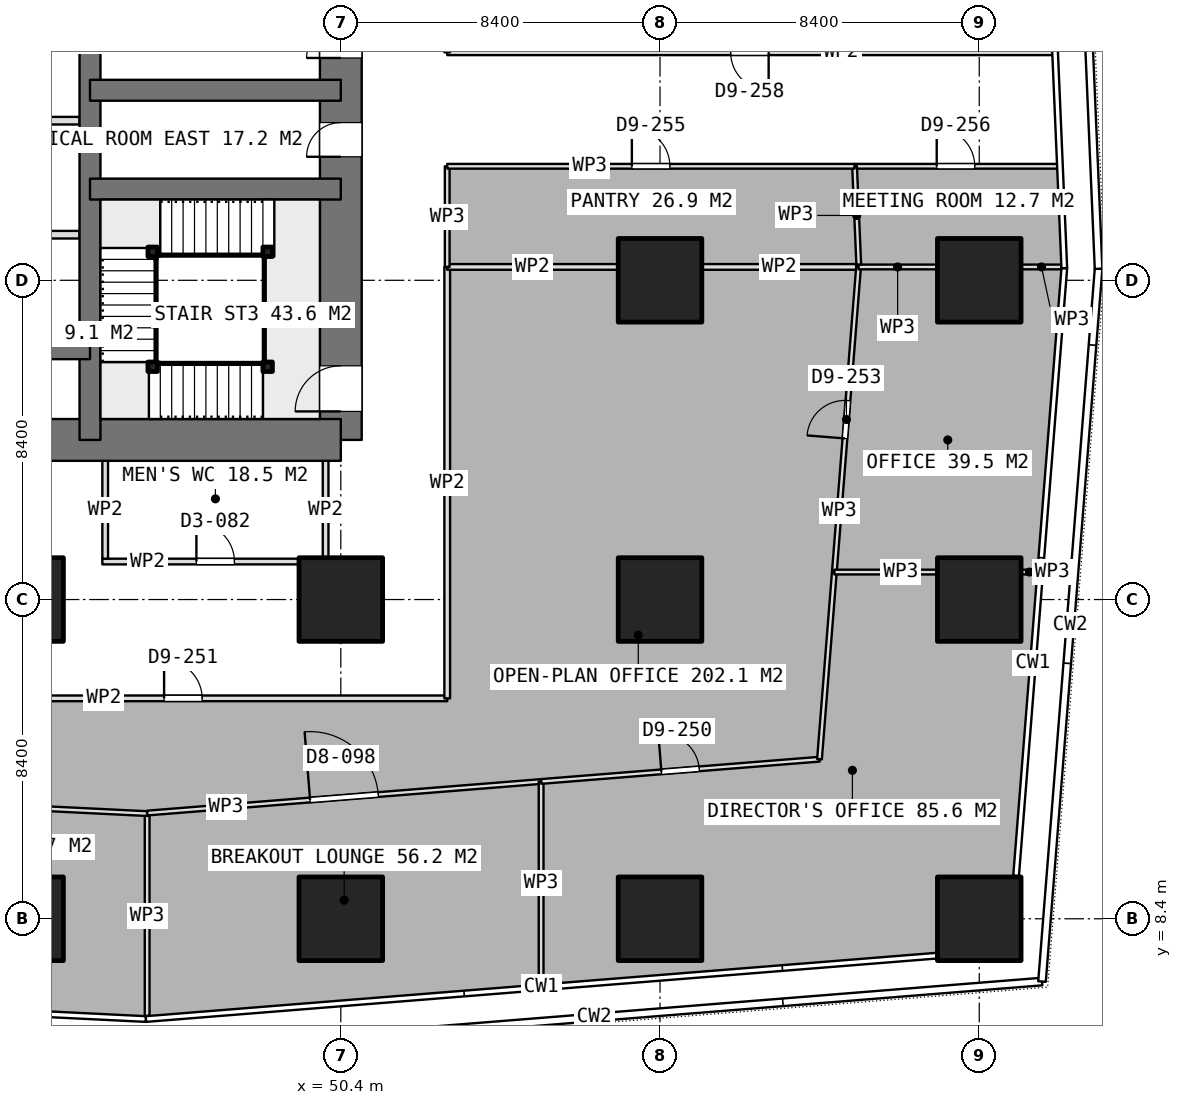
"""IFC4 building model, lengths in metres.
Left out: names, types, materials, properties, quantities, classifications, styles, units other than length and angle.
Written with IfcOpenShell. Run it as: python <this file> out.ifc"""

import sys

from ifc_helpers import new_model, si_unit, direction, frame, frame_2d, origin, origin_2d, place, context, subcontext, project, spatial, rectangle, extrude, element, fill, save


model = new_model("IFC4")
c1 = context("Model", 3, precision=1e-05, world=origin(), true_north=direction((0.0, 1.0)))
c2 = subcontext(c1, "Body", "Model", "MODEL_VIEW")
j1 = project(units=[si_unit("LENGTHUNIT", "METRE"), si_unit("PLANEANGLEUNIT", "RADIAN")], contexts=[c1])
p1 = place(None, origin())
s1 = spatial("IfcSite", under=j1, at=p1, CompositionType="ELEMENT")
p2 = place(p1, origin())
s2 = spatial("IfcBuilding", under=s1, at=p2, CompositionType="ELEMENT")
p3 = place(p2, frame((0.0, 0.0, 74.15)))
s3 = spatial("IfcBuildingStorey", under=s2, at=p3, CompositionType="ELEMENT", Elevation=74.15)
p4 = place(p3, frame((40.0, 21.0, 0.0), z_axis=(0.0, 0.0, 1.0), x_axis=(1.0, 0.0, 0.0)))
e1 = element("IfcWall", 1, at=p4, inside=s3, PredefinedType="SHEAR", context=c2, shape_type="SweptSolid", body=[
    extrude(rectangle(XDim=10.4, YDim=1.1, at=frame_2d((5.2, 0.0))), origin(), (0.0, 0.0, 1.0), 3.75),
])
p5 = place(p3, frame((50.4, 21.0, 0.0), z_axis=(0.0, 0.0, 1.0), x_axis=(0.0, 1.0, 0.0)))
e2 = element("IfcWall", 2, at=p5, inside=s3, PredefinedType="SHEAR", context=c2, shape_type="SweptSolid", body=[
    extrude(rectangle(XDim=25.2, YDim=1.1, at=frame_2d((12.6, 0.0))), origin(), (0.0, 0.0, 1.0), 3.75),
])
p6 = place(p5, frame((16.2, 0.0, 0.0)))
e3 = element("IfcOpeningElement", 3, at=p6, cuts=e2, PredefinedType="OPENING", context=c2, shape_type="SweptSolid", body=[
    extrude(rectangle(XDim=1.2, YDim=2.1, at=frame_2d((0.6, 1.05))), frame((0.0, 0.56, 0.0), z_axis=(0.0, -1.0, 0.0), x_axis=(1.0, 0.0, 0.0)), (0.0, 0.0, 1.0), 1.12),
])
p7 = place(p5, frame((10.05, 0.0, 0.0)))
e4 = element("IfcOpeningElement", 4, at=p7, cuts=e2, PredefinedType="OPENING", context=c2, shape_type="SweptSolid", body=[
    extrude(rectangle(XDim=0.9, YDim=2.1, at=frame_2d((0.45, 1.05))), frame((0.0, 0.56, 0.0), z_axis=(0.0, -1.0, 0.0), x_axis=(1.0, 0.0, 0.0)), (0.0, 0.0, 1.0), 1.12),
])
p8 = place(p5, frame((7.45, 0.0, 0.0)))
e5 = element("IfcOpeningElement", 5, at=p8, cuts=e2, PredefinedType="OPENING", context=c2, shape_type="SweptSolid", body=[
    extrude(rectangle(XDim=0.9, YDim=2.1, at=frame_2d((0.45, 1.05))), frame((0.0, 0.56, 0.0), z_axis=(0.0, -1.0, 0.0), x_axis=(1.0, 0.0, 0.0)), (0.0, 0.0, 1.0), 1.12),
])
p9 = place(p5, frame((0.75, 0.0, 0.0)))
e6 = element("IfcOpeningElement", 6, at=p9, cuts=e2, PredefinedType="OPENING", context=c2, shape_type="SweptSolid", body=[
    extrude(rectangle(XDim=1.2, YDim=2.1, at=frame_2d((0.6, 1.05))), frame((0.0, 0.56, 0.0), z_axis=(0.0, -1.0, 0.0), x_axis=(1.0, 0.0, 0.0)), (0.0, 0.0, 1.0), 1.12),
])
p10 = place(p3, frame((43.8, 21.0, 0.0), z_axis=(0.0, 0.0, 1.0), x_axis=(0.0, 1.0, 0.0)))
e7 = element("IfcWall", 7, at=p10, inside=s3, PredefinedType="SHEAR", context=c2, shape_type="SweptSolid", body=[
    extrude(rectangle(XDim=25.2, YDim=0.55, at=frame_2d((12.6, 0.0))), origin(), (0.0, 0.0, 1.0), 3.75),
])
p11 = place(p3, frame((40.0, 23.4, 0.0), z_axis=(0.0, 0.0, 1.0), x_axis=(1.0, 0.0, 0.0)))
e8 = element("IfcWall", 8, at=p11, inside=s3, PredefinedType="SHEAR", context=c2, shape_type="SweptSolid", body=[
    extrude(rectangle(XDim=3.8, YDim=0.55, at=frame_2d((1.9, 0.0))), origin(), (0.0, 0.0, 1.0), 3.75),
])
for number, where, z_axis, x_axis in (
    (9, (43.8, 27.6, 0.0), (0.0, 0.0, 1.0), (1.0, 0.0, 0.0)),
    (10, (43.8, 30.2, 0.0), (0.0, 0.0, 1.0), (1.0, 0.0, 0.0)),
):
    element("IfcWall", number, at=place(p3, frame(where, z_axis=z_axis, x_axis=x_axis)), inside=s3, PredefinedType="SHEAR", context=c2, shape_type="SweptSolid", body=[
        extrude(rectangle(XDim=6.6, YDim=0.55, at=frame_2d((3.3, 0.0))), origin(), (0.0, 0.0, 1.0), 3.75),
    ])
for number, where, z_axis, x_axis in (
    (11, (42.0, 8.4, 0.0), (0.0, 0.0, 1.0), (1.0, 0.0, 0.0)),
    (12, (42.0, 16.8, 0.0), (0.0, 0.0, 1.0), (1.0, 0.0, 0.0)),
    (13, (50.4, 8.4, 0.0), (0.0, 0.0, 1.0), (1.0, 0.0, 0.0)),
    (14, (50.4, 16.8, 0.0), (0.0, 0.0, 1.0), (1.0, 0.0, 0.0)),
    (15, (58.8, 8.4, 0.0), (0.0, 0.0, 1.0), (1.0, 0.0, 0.0)),
    (16, (58.8, 16.8, 0.0), (0.0, 0.0, 1.0), (1.0, 0.0, 0.0)),
    (17, (58.8, 25.2, 0.0), (0.0, 0.0, 1.0), (1.0, 0.0, 0.0)),
    (18, (67.2, 8.4, 0.0), (0.0, 0.0, 1.0), (1.0, 0.0, 0.0)),
    (19, (67.2, 16.8, 0.0), (0.0, 0.0, 1.0), (1.0, 0.0, 0.0)),
    (20, (67.2, 25.2, 0.0), (0.0, 0.0, 1.0), (1.0, 0.0, 0.0)),
):
    element("IfcColumn", number, at=place(p3, frame(where, z_axis=z_axis, x_axis=x_axis)), inside=s3, PredefinedType="COLUMN", context=c2, shape_type="SweptSolid", body=[
        extrude(rectangle(XDim=2.2, YDim=2.2, at=origin_2d()), origin(), (0.0, 0.0, 1.0), 3.75),
    ])
for number, where, z_axis, x_axis in (
    (21, (40.5, 26.4, 0.0), (0.0, 0.0, 1.0), (1.0, 0.0, 0.0)),
    (22, (40.5, 29.4, 0.0), (0.0, 0.0, 1.0), (1.0, 0.0, 0.0)),
):
    element("IfcWall", number, at=place(p3, frame(where, z_axis=z_axis, x_axis=x_axis)), inside=s3, PredefinedType="PARTITIONING", context=c2, shape_type="SweptSolid", body=[
        extrude(rectangle(XDim=3.025, YDim=0.2, at=frame_2d((1.512, 0.0))), origin(), (0.0, 0.0, 1.0), 3.5),
    ])
p12 = place(p3, frame((44.125, 17.8, 0.0), z_axis=(0.0, 0.0, 1.0), x_axis=(1.0, 0.0, 0.0)))
e23 = element("IfcWall", 23, at=p12, inside=s3, PredefinedType="PARTITIONING", context=c2, shape_type="SweptSolid", body=[
    extrude(rectangle(XDim=5.95, YDim=0.15, at=frame_2d((2.975, 0.0))), origin(), (0.0, 0.0, 1.0), 3.5),
])
p13 = place(p12, frame((2.475, 0.0, 0.0)))
e24 = element("IfcOpeningElement", 24, at=p13, cuts=e23, PredefinedType="OPENING", context=c2, shape_type="SweptSolid", body=[
    extrude(rectangle(XDim=1.0, YDim=2.1, at=frame_2d((0.5, 1.05))), frame((0.0, 0.085, 0.0), z_axis=(0.0, -1.0, 0.0), x_axis=(1.0, 0.0, 0.0)), (0.0, 0.0, 1.0), 0.17),
])
for number, where, z_axis, x_axis in (
    (25, (44.2, 17.875, 0.0), (0.0, 0.0, 1.0), (0.0, 1.0, 0.0)),
    (26, (50.0, 17.875, 0.0), (0.0, 0.0, 1.0), (0.0, 1.0, 0.0)),
):
    element("IfcWall", number, at=place(p3, frame(where, z_axis=z_axis, x_axis=x_axis)), inside=s3, PredefinedType="PARTITIONING", context=c2, shape_type="SweptSolid", body=[
        extrude(rectangle(XDim=2.575, YDim=0.15, at=frame_2d((1.288, 0.0))), origin(), (0.0, 0.0, 1.0), 3.5),
    ])
p14 = place(p3, frame((36.299, 11.609, 0.0), z_axis=(0.0, 0.0, 1.0), x_axis=(0.998798622269, -0.049003185143, 0.0)))
e27 = element("IfcWall", 27, at=p14, inside=s3, PredefinedType="PARTITIONING", context=c2, shape_type="SweptSolid", body=[
    extrude(rectangle(XDim=9.018, YDim=0.125, at=frame_2d((4.509, 0.0))), origin(), (0.0, 0.0, 1.0), 3.5),
])
p15 = place(p14, frame((3.608, 0.0, 0.0)))
e28 = element("IfcOpeningElement", 28, at=p15, cuts=e27, PredefinedType="OPENING", context=c2, shape_type="SweptSolid", body=[
    extrude(rectangle(XDim=1.8, YDim=2.1, at=frame_2d((0.9, 1.05))), frame((0.0, 0.073, 0.0), z_axis=(0.0, -1.0, 0.0), x_axis=(1.0, 0.0, 0.0)), (0.0, 0.0, 1.0), 0.145),
])
p16 = place(p3, frame((45.304, 11.107, 0.0), z_axis=(0.0, 0.0, 1.0), x_axis=(0.0, -1.0, 0.0)))
e29 = element("IfcWall", 29, at=p16, inside=s3, PredefinedType="PARTITIONING", context=c2, shape_type="SweptSolid", body=[
    extrude(rectangle(XDim=5.262, YDim=0.125, at=frame_2d((2.631, 0.0))), origin(), (0.0, 0.0, 1.0), 3.5),
])
p17 = place(p3, frame((45.307, 11.182, 0.0), z_axis=(0.0, 0.0, 1.0), x_axis=(0.996807957409, 0.079836683593, 0.0)))
e30 = element("IfcWall", 30, at=p17, inside=s3, PredefinedType="PARTITIONING", context=c2, shape_type="SweptSolid", body=[
    extrude(rectangle(XDim=10.397, YDim=0.125, at=frame_2d((5.199, 0.0))), origin(), (0.0, 0.0, 1.0), 3.5),
])
p18 = place(p17, frame((4.298, 0.0, 0.0)))
e31 = element("IfcOpeningElement", 31, at=p18, cuts=e30, PredefinedType="OPENING", context=c2, shape_type="SweptSolid", body=[
    extrude(rectangle(XDim=1.8, YDim=2.1, at=frame_2d((0.9, 1.05))), frame((0.0, 0.073, 0.0), z_axis=(0.0, -1.0, 0.0), x_axis=(1.0, 0.0, 0.0)), (0.0, 0.0, 1.0), 0.145),
])
p19 = place(p3, frame((55.671, 12.012, 0.0), z_axis=(0.0, 0.0, 1.0), x_axis=(0.0, -1.0, 0.0)))
e32 = element("IfcWall", 32, at=p19, inside=s3, PredefinedType="PARTITIONING", context=c2, shape_type="SweptSolid", body=[
    extrude(rectangle(XDim=5.337, YDim=0.125, at=frame_2d((2.668, 0.0))), origin(), (0.0, 0.0, 1.0), 3.5),
])
p20 = place(p3, frame((55.673, 12.013, 0.0), z_axis=(0.0, 0.0, 1.0), x_axis=(0.996811579084, 0.079791451955, 0.0)))
e33 = element("IfcWall", 33, at=p20, inside=s3, PredefinedType="PARTITIONING", context=c2, shape_type="SweptSolid", body=[
    extrude(rectangle(XDim=7.346, YDim=0.125, at=frame_2d((3.673, 0.0))), origin(), (0.0, 0.0, 1.0), 3.5),
])
p21 = place(p20, frame((3.173, 0.0, 0.0)))
e34 = element("IfcOpeningElement", 34, at=p21, cuts=e33, PredefinedType="OPENING", context=c2, shape_type="SweptSolid", body=[
    extrude(rectangle(XDim=1.0, YDim=2.1, at=frame_2d((0.5, 1.05))), frame((0.0, 0.073, 0.0), z_axis=(0.0, -1.0, 0.0), x_axis=(1.0, 0.0, 0.0)), (0.0, 0.0, 1.0), 0.145),
])
p22 = place(p3, frame((62.996, 12.599, 0.0), z_axis=(0.0, 0.0, 1.0), x_axis=(0.079134233178, 0.996863969225, 0.0)))
e35 = element("IfcWall", 35, at=p22, inside=s3, PredefinedType="PARTITIONING", context=c2, shape_type="SweptSolid", body=[
    extrude(rectangle(XDim=4.939, YDim=0.125, at=frame_2d((2.47, 0.0))), origin(), (0.0, 0.0, 1.0), 3.5),
])
p23 = place(p3, frame((63.387, 17.523, 0.0), z_axis=(0.0, 0.0, 1.0), x_axis=(1.0, 0.0, 0.0)))
e36 = element("IfcWall", 36, at=p23, inside=s3, PredefinedType="PARTITIONING", context=c2, shape_type="SweptSolid", body=[
    extrude(rectangle(XDim=2.693, YDim=0.125, at=frame_2d((1.347, 0.0))), origin(), (0.0, 0.0, 1.0), 3.5),
])
p24 = place(p3, frame((68.32, 17.523, 0.0), z_axis=(0.0, 0.0, 1.0), x_axis=(1.0, 0.0, 0.0)))
e37 = element("IfcWall", 37, at=p24, inside=s3, PredefinedType="PARTITIONING", context=c2, shape_type="SweptSolid", body=[
    extrude(rectangle(XDim=0.403, YDim=0.125, at=frame_2d((0.201, 0.0))), origin(), (0.0, 0.0, 1.0), 3.5),
])
p25 = place(p3, frame((63.387, 17.524, 0.0), z_axis=(0.0, 0.0, 1.0), x_axis=(0.079102910118, 0.996866455254, 0.0)))
e38 = element("IfcWall", 38, at=p25, inside=s3, PredefinedType="PARTITIONING", context=c2, shape_type="SweptSolid", body=[
    extrude(rectangle(XDim=8.052, YDim=0.125, at=frame_2d((4.026, 0.0))), origin(), (0.0, 0.0, 1.0), 3.5),
])
p26 = place(p25, frame((3.526, 0.0, 0.0)))
e39 = element("IfcOpeningElement", 39, at=p26, cuts=e38, PredefinedType="OPENING", context=c2, shape_type="SweptSolid", body=[
    extrude(rectangle(XDim=1.0, YDim=2.1, at=frame_2d((0.5, 1.05))), frame((0.0, 0.073, 0.0), z_axis=(0.0, -1.0, 0.0), x_axis=(1.0, 0.0, 0.0)), (0.0, 0.0, 1.0), 0.145),
])
p27 = place(p3, frame((64.024, 25.551, 0.0), z_axis=(0.0, 0.0, 1.0), x_axis=(1.0, 0.0, 0.0)))
e40 = element("IfcWall", 40, at=p27, inside=s3, PredefinedType="PARTITIONING", context=c2, shape_type="SweptSolid", body=[
    extrude(rectangle(XDim=2.056, YDim=0.125, at=frame_2d((1.028, 0.0))), origin(), (0.0, 0.0, 1.0), 3.5),
])
p28 = place(p3, frame((68.32, 25.551, 0.0), z_axis=(0.0, 0.0, 1.0), x_axis=(1.0, 0.0, 0.0)))
e41 = element("IfcWall", 41, at=p28, inside=s3, PredefinedType="PARTITIONING", context=c2, shape_type="SweptSolid", body=[
    extrude(rectangle(XDim=1.037, YDim=0.125, at=frame_2d((0.519, 0.0))), origin(), (0.0, 0.0, 1.0), 3.5),
])
p29 = place(p3, frame((39.3, 14.2, 0.0), z_axis=(0.0, 0.0, 1.0), x_axis=(1.0, 0.0, 0.0)))
e42 = element("IfcWall", 42, at=p29, inside=s3, PredefinedType="PARTITIONING", context=c2, shape_type="SweptSolid", body=[
    extrude(rectangle(XDim=13.9, YDim=0.15, at=frame_2d((6.95, 0.0))), origin(), (0.0, 0.0, 1.0), 3.5),
])
p30 = place(p29, frame((6.45, 0.0, 0.0)))
e43 = element("IfcOpeningElement", 43, at=p30, cuts=e42, PredefinedType="OPENING", context=c2, shape_type="SweptSolid", body=[
    extrude(rectangle(XDim=1.0, YDim=2.1, at=frame_2d((0.5, 1.05))), frame((0.0, 0.085, 0.0), z_axis=(0.0, -1.0, 0.0), x_axis=(1.0, 0.0, 0.0)), (0.0, 0.0, 1.0), 0.17),
])
p31 = place(p3, frame((53.2, 14.2, 0.0), z_axis=(0.0, 0.0, 1.0), x_axis=(0.0, 1.0, 0.0)))
e44 = element("IfcWall", 44, at=p31, inside=s3, PredefinedType="PARTITIONING", context=c2, shape_type="SweptSolid", body=[
    extrude(rectangle(XDim=11.352, YDim=0.15, at=frame_2d((5.676, 0.0))), origin(), (0.0, 0.0, 1.0), 3.5),
])
p32 = place(p3, frame((53.2, 25.552, 0.0), z_axis=(0.0, 0.0, 1.0), x_axis=(1.0, 0.0, 0.0)))
e45 = element("IfcWall", 45, at=p32, inside=s3, PredefinedType="PARTITIONING", context=c2, shape_type="SweptSolid", body=[
    extrude(rectangle(XDim=4.48, YDim=0.15, at=frame_2d((2.24, 0.0))), origin(), (0.0, 0.0, 1.0), 3.5),
])
p33 = place(p3, frame((59.92, 25.552, 0.0), z_axis=(0.0, 0.0, 1.0), x_axis=(1.0, 0.0, 0.0)))
e46 = element("IfcWall", 46, at=p33, inside=s3, PredefinedType="PARTITIONING", context=c2, shape_type="SweptSolid", body=[
    extrude(rectangle(XDim=4.041, YDim=0.15, at=frame_2d((2.021, 0.0))), origin(), (0.0, 0.0, 1.0), 3.5),
])
p34 = place(p3, frame((69.145, 31.2, 0.0), z_axis=(0.0, 0.0, 1.0), x_axis=(-1.0, 0.0, 0.0)))
e47 = element("IfcWall", 47, at=p34, inside=s3, PredefinedType="PARTITIONING", context=c2, shape_type="SweptSolid", body=[
    extrude(rectangle(XDim=15.945, YDim=0.15, at=frame_2d((7.973, 0.0))), origin(), (0.0, 0.0, 1.0), 3.5),
])
p35 = place(p34, frame((7.487, 0.0, 0.0)))
e48 = element("IfcOpeningElement", 48, at=p35, cuts=e47, PredefinedType="OPENING", context=c2, shape_type="SweptSolid", body=[
    extrude(rectangle(XDim=1.0, YDim=2.1, at=frame_2d((0.5, 1.05))), frame((0.0, 0.085, 0.0), z_axis=(0.0, -1.0, 0.0), x_axis=(1.0, 0.0, 0.0)), (0.0, 0.0, 1.0), 0.17),
])
p36 = place(p3, frame((63.919, 28.2, 0.0), z_axis=(0.0, 0.0, 1.0), x_axis=(1.0, 0.0, 0.0)))
e49 = element("IfcWall", 49, at=p36, inside=s3, PredefinedType="PARTITIONING", context=c2, shape_type="SweptSolid", body=[
    extrude(rectangle(XDim=5.355, YDim=0.125, at=frame_2d((2.677, 0.0))), origin(), (0.0, 0.0, 1.0), 3.5),
])
p37 = place(p36, frame((2.162, 0.0, 0.0)))
e50 = element("IfcOpeningElement", 50, at=p37, cuts=e49, PredefinedType="OPENING", context=c2, shape_type="SweptSolid", body=[
    extrude(rectangle(XDim=1.0, YDim=2.1, at=frame_2d((0.5, 1.05))), frame((0.0, 0.073, 0.0), z_axis=(0.0, -1.0, 0.0), x_axis=(1.0, 0.0, 0.0)), (0.0, 0.0, 1.0), 0.145),
])
p38 = place(p3, frame((64.029, 25.613, 0.0), z_axis=(0.0, 0.0, 1.0), x_axis=(-0.042524729329, 0.99909541456, 0.0)))
e51 = element("IfcWall", 51, at=p38, inside=s3, PredefinedType="PARTITIONING", context=c2, shape_type="SweptSolid", body=[
    extrude(rectangle(XDim=2.589, YDim=0.125, at=frame_2d((1.295, 0.0))), origin(), (0.0, 0.0, 1.0), 3.5),
])
p39 = place(p3, frame((53.2, 25.552, 0.0), z_axis=(0.0, 0.0, 1.0), x_axis=(0.0, 1.0, 0.0)))
e52 = element("IfcWall", 52, at=p39, inside=s3, PredefinedType="PARTITIONING", context=c2, shape_type="SweptSolid", body=[
    extrude(rectangle(XDim=2.648, YDim=0.125, at=frame_2d((1.324, 0.0))), origin(), (0.0, 0.0, 1.0), 3.5),
])
p40 = place(p3, frame((53.2, 28.2, 0.0), z_axis=(0.0, 0.0, 1.0), x_axis=(1.0, 0.0, 0.0)))
e53 = element("IfcWall", 53, at=p40, inside=s3, PredefinedType="PARTITIONING", context=c2, shape_type="SweptSolid", body=[
    extrude(rectangle(XDim=10.719, YDim=0.125, at=frame_2d((5.359, 0.0))), origin(), (0.0, 0.0, 1.0), 3.5),
])
p41 = place(p40, frame((4.859, 0.0, 0.0)))
e54 = element("IfcOpeningElement", 54, at=p41, cuts=e53, PredefinedType="OPENING", context=c2, shape_type="SweptSolid", body=[
    extrude(rectangle(XDim=1.0, YDim=2.1, at=frame_2d((0.5, 1.05))), frame((0.0, 0.073, 0.0), z_axis=(0.0, -1.0, 0.0), x_axis=(1.0, 0.0, 0.0)), (0.0, 0.0, 1.0), 0.145),
])
for number, where, z_axis, x_axis in (
    (55, (48.475, 22.925, 0.0), (0.0, 0.0, 1.0), (1.0, 0.0, 0.0)),
    (56, (45.45, 22.925, 0.0), (0.0, 0.0, 1.0), (1.0, 0.0, 0.0)),
    (57, (45.45, 25.95, 0.0), (0.0, 0.0, 1.0), (1.0, 0.0, 0.0)),
    (58, (48.475, 25.95, 0.0), (0.0, 0.0, 1.0), (1.0, 0.0, 0.0)),
):
    element("IfcColumn", number, at=place(p3, frame(where, z_axis=z_axis, x_axis=x_axis)), inside=s3, PredefinedType="COLUMN", context=c2, shape_type="SweptSolid", body=[
        extrude(rectangle(XDim=0.25, YDim=0.25, at=origin_2d()), origin(), (0.0, 0.0, 1.0), 3.75),
    ])
p42 = place(p7, origin())
e59 = element("IfcDoor", 59, at=p42, inside=s3, OperationType="SINGLE_SWING_LEFT", PredefinedType="DOOR", context=c2, shape_type="SweptSolid", body=[
    extrude(rectangle(XDim=0.9, YDim=2.1, at=frame_2d((0.45, 1.05))), frame((0.0, 0.025, 0.0), z_axis=(0.0, -1.0, 0.0), x_axis=(1.0, 0.0, 0.0)), (0.0, 0.0, 1.0), 0.05),
])
fill(e4, e59)
p43 = place(p8, origin())
e60 = element("IfcDoor", 60, at=p43, inside=s3, OperationType="SINGLE_SWING_LEFT", PredefinedType="DOOR", context=c2, shape_type="SweptSolid", body=[
    extrude(rectangle(XDim=0.9, YDim=2.1, at=frame_2d((0.45, 1.05))), frame((0.0, 0.025, 0.0), z_axis=(0.0, -1.0, 0.0), x_axis=(1.0, 0.0, 0.0)), (0.0, 0.0, 1.0), 0.05),
])
fill(e5, e60)
p44 = place(p13, origin())
e61 = element("IfcDoor", 61, at=p44, inside=s3, OperationType="SINGLE_SWING_LEFT", PredefinedType="DOOR", context=c2, shape_type="SweptSolid", body=[
    extrude(rectangle(XDim=1.0, YDim=2.1, at=frame_2d((0.5, 1.05))), frame((0.0, 0.025, 0.0), z_axis=(0.0, -1.0, 0.0), x_axis=(1.0, 0.0, 0.0)), (0.0, 0.0, 1.0), 0.05),
])
fill(e24, e61)
p45 = place(p18, origin())
e62 = element("IfcDoor", 62, at=p45, inside=s3, OperationType="DOUBLE_DOOR_SINGLE_SWING", PredefinedType="DOOR", context=c2, shape_type="SweptSolid", body=[
    extrude(rectangle(XDim=1.8, YDim=2.1, at=frame_2d((0.9, 1.05))), frame((0.0, 0.025, 0.0), z_axis=(0.0, -1.0, 0.0), x_axis=(1.0, 0.0, 0.0)), (0.0, 0.0, 1.0), 0.05),
])
fill(e31, e62)
p46 = place(p21, origin())
e63 = element("IfcDoor", 63, at=p46, inside=s3, OperationType="SINGLE_SWING_LEFT", PredefinedType="DOOR", context=c2, shape_type="SweptSolid", body=[
    extrude(rectangle(XDim=1.0, YDim=2.1, at=frame_2d((0.5, 1.05))), frame((0.0, 0.025, 0.0), z_axis=(0.0, -1.0, 0.0), x_axis=(1.0, 0.0, 0.0)), (0.0, 0.0, 1.0), 0.05),
])
fill(e34, e63)
p47 = place(p26, origin())
e64 = element("IfcDoor", 64, at=p47, inside=s3, OperationType="SINGLE_SWING_LEFT", PredefinedType="DOOR", context=c2, shape_type="SweptSolid", body=[
    extrude(rectangle(XDim=1.0, YDim=2.1, at=frame_2d((0.5, 1.05))), frame((0.0, 0.025, 0.0), z_axis=(0.0, -1.0, 0.0), x_axis=(1.0, 0.0, 0.0)), (0.0, 0.0, 1.0), 0.05),
])
fill(e39, e64)
p48 = place(p30, origin())
e65 = element("IfcDoor", 65, at=p48, inside=s3, OperationType="SINGLE_SWING_LEFT", PredefinedType="DOOR", context=c2, shape_type="SweptSolid", body=[
    extrude(rectangle(XDim=1.0, YDim=2.1, at=frame_2d((0.5, 1.05))), frame((0.0, 0.025, 0.0), z_axis=(0.0, -1.0, 0.0), x_axis=(1.0, 0.0, 0.0)), (0.0, 0.0, 1.0), 0.05),
])
fill(e43, e65)
p49 = place(p35, origin())
e66 = element("IfcDoor", 66, at=p49, inside=s3, OperationType="SINGLE_SWING_LEFT", PredefinedType="DOOR", context=c2, shape_type="SweptSolid", body=[
    extrude(rectangle(XDim=1.0, YDim=2.1, at=frame_2d((0.5, 1.05))), frame((0.0, 0.025, 0.0), z_axis=(0.0, -1.0, 0.0), x_axis=(1.0, 0.0, 0.0)), (0.0, 0.0, 1.0), 0.05),
])
fill(e48, e66)
p50 = place(p37, origin())
e67 = element("IfcDoor", 67, at=p50, inside=s3, OperationType="SINGLE_SWING_LEFT", PredefinedType="DOOR", context=c2, shape_type="SweptSolid", body=[
    extrude(rectangle(XDim=1.0, YDim=2.1, at=frame_2d((0.5, 1.05))), frame((0.0, 0.025, 0.0), z_axis=(0.0, -1.0, 0.0), x_axis=(1.0, 0.0, 0.0)), (0.0, 0.0, 1.0), 0.05),
])
fill(e50, e67)
p51 = place(p41, origin())
e68 = element("IfcDoor", 68, at=p51, inside=s3, OperationType="SINGLE_SWING_LEFT", PredefinedType="DOOR", context=c2, shape_type="SweptSolid", body=[
    extrude(rectangle(XDim=1.0, YDim=2.1, at=frame_2d((0.5, 1.05))), frame((0.0, 0.025, 0.0), z_axis=(0.0, -1.0, 0.0), x_axis=(1.0, 0.0, 0.0)), (0.0, 0.0, 1.0), 0.05),
])
fill(e54, e68)
p52 = place(p9, origin())
e69 = element("IfcDoor", 69, at=p52, inside=s3, OperationType="SINGLE_SWING_RIGHT", PredefinedType="DOOR", context=c2, shape_type="SweptSolid", body=[
    extrude(rectangle(XDim=1.2, YDim=2.1, at=frame_2d((0.6, 1.05))), frame((0.0, 0.025, 0.0), z_axis=(0.0, -1.0, 0.0), x_axis=(1.0, 0.0, 0.0)), (0.0, 0.0, 1.0), 0.05),
])
fill(e6, e69)
save(model, sys.argv[1])
